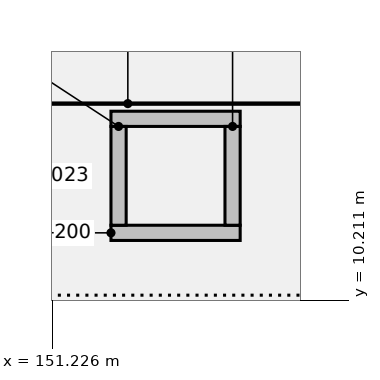
"""IFC4 building model, lengths in metres.
Left out: names, types, materials, properties, quantities, classifications, styles, units other than length and angle.
Written with IfcOpenShell. Run it as: python <this file> out.ifc"""

import sys

from ifc_helpers import new_model, si_unit, direction, frame, frame_2d, origin, place, context, subcontext, project, spatial, rectangle, extrude, element, save


model = new_model("IFC4")
c1 = context("Model", 3, precision=1e-05, world=origin(), true_north=direction((0.0, 1.0)))
c2 = subcontext(c1, "Body", "Model", "MODEL_VIEW")
j1 = project(units=[si_unit("LENGTHUNIT", "METRE"), si_unit("PLANEANGLEUNIT", "RADIAN")], contexts=[c1])
p1 = place(None, origin())
s1 = spatial("IfcSite", under=j1, at=p1, CompositionType="ELEMENT")
p2 = place(p1, origin())
s2 = spatial("IfcBuilding", under=s1, at=p2, CompositionType="ELEMENT")
p3 = place(p2, frame((0.0, 0.0, -4.8)))
s3 = spatial("IfcBuildingStorey", under=s2, at=p3, CompositionType="ELEMENT", Elevation=-4.8)
for number, where, z_axis, x_axis in (
    (1, (152.0, 11.1, 0.0), (0.0, 0.0, 1.0), (1.0, 0.0, 0.0)),
    (2, (153.7, 12.6, 0.0), (0.0, 0.0, 1.0), (-1.0, 0.0, 0.0)),
):
    element("IfcWall", number, at=place(p3, frame(where, z_axis=z_axis, x_axis=x_axis)), inside=s3, PredefinedType="PARTITIONING", context=c2, shape_type="SweptSolid", body=[
        extrude(rectangle(XDim=1.7, YDim=0.2, at=frame_2d((0.85, 0.0))), origin(), (0.0, 0.0, 1.0), 4.5),
    ])
for number, where, z_axis, x_axis in (
    (3, (152.1, 11.2, 0.0), (0.0, 0.0, 1.0), (0.0, 1.0, 0.0)),
    (4, (153.6, 12.5, 0.0), (0.0, 0.0, 1.0), (0.0, -1.0, 0.0)),
):
    element("IfcWall", number, at=place(p3, frame(where, z_axis=z_axis, x_axis=x_axis)), inside=s3, PredefinedType="PARTITIONING", context=c2, shape_type="SweptSolid", body=[
        extrude(rectangle(XDim=1.3, YDim=0.2, at=frame_2d((0.65, 0.0))), origin(), (0.0, 0.0, 1.0), 4.5),
    ])
save(model, sys.argv[1])
